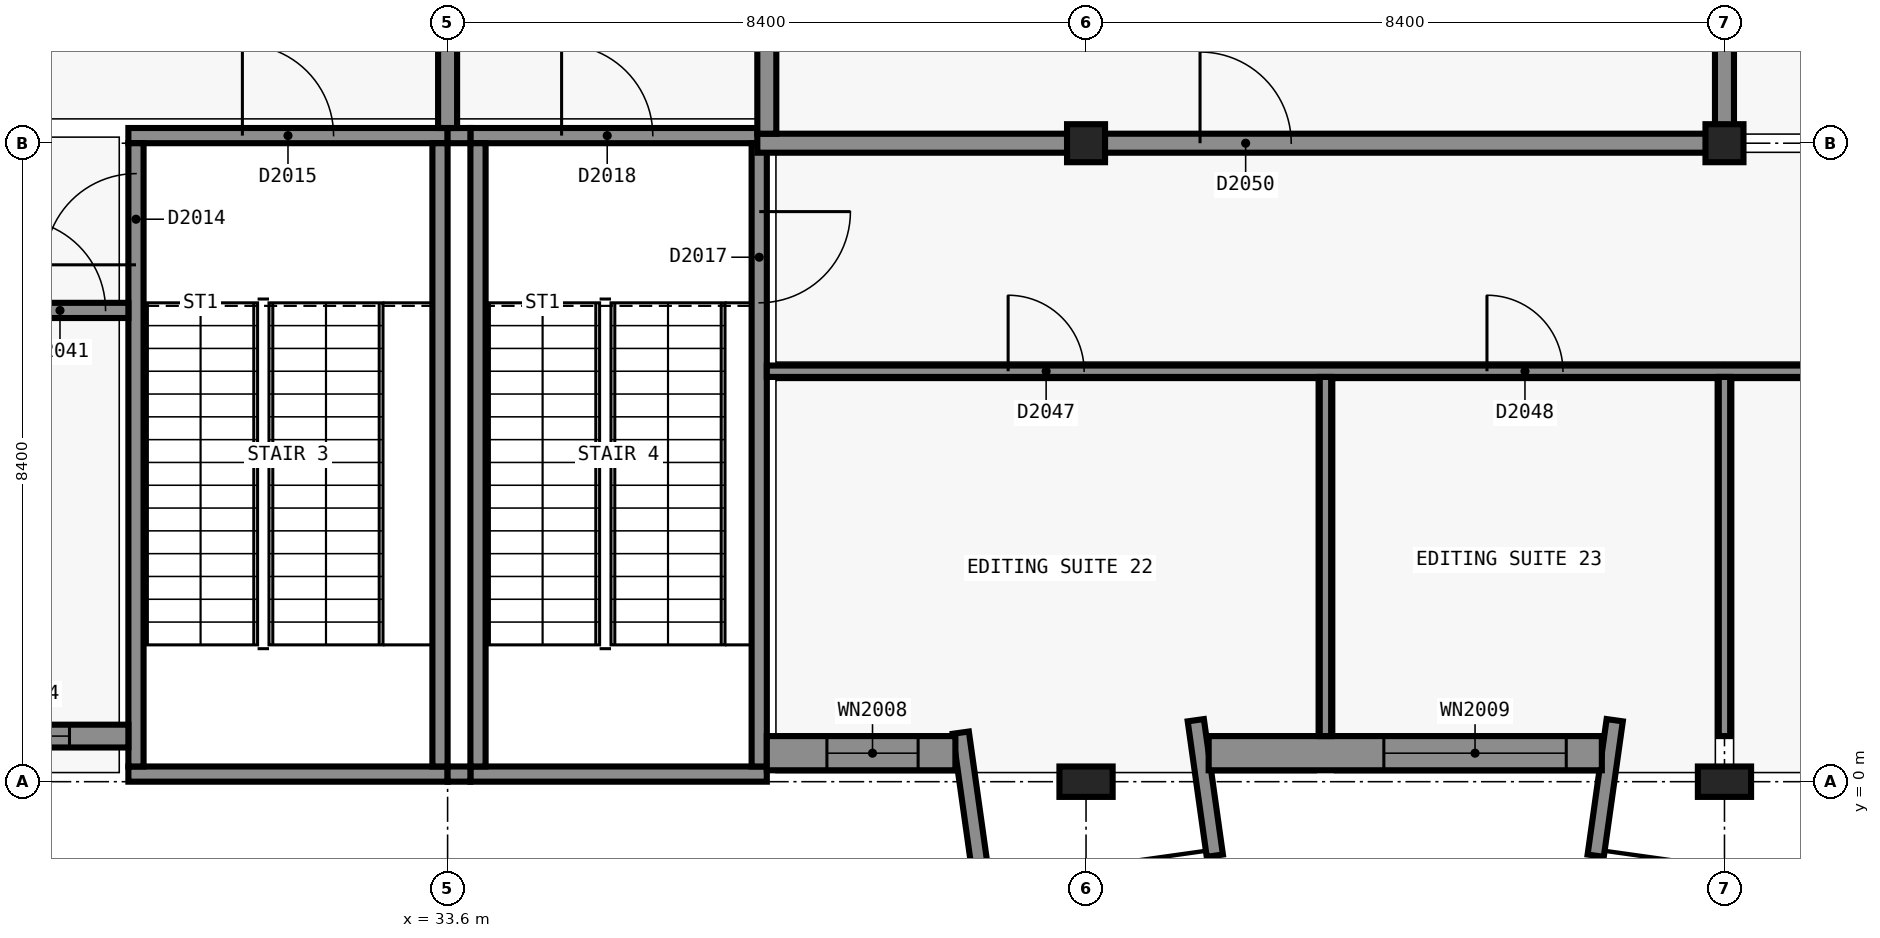
"""IFC4 building model, lengths in metres.
Left out: names, types, materials, properties, quantities, classifications, styles, units other than length and angle.
Written with IfcOpenShell. Run it as: python <this file> out.ifc"""

import sys

from ifc_helpers import new_model, si_unit, direction, frame, frame_2d, origin, origin_2d, place, context, subcontext, project, spatial, rectangle, extrude, element, fill, save


model = new_model("IFC4")
c1 = context("Model", 3, precision=1e-05, world=origin(), true_north=direction((0.0, 1.0)))
c2 = subcontext(c1, "Body", "Model", "MODEL_VIEW")
j1 = project(units=[si_unit("LENGTHUNIT", "METRE"), si_unit("PLANEANGLEUNIT", "RADIAN")], contexts=[c1])
p1 = place(None, origin())
s1 = spatial("IfcSite", under=j1, at=p1, CompositionType="ELEMENT")
p2 = place(p1, origin())
s2 = spatial("IfcBuilding", under=s1, at=p2, CompositionType="ELEMENT")
p3 = place(p2, frame((0.0, 0.0, 10.2)))
s3 = spatial("IfcBuildingStorey", under=s2, at=p3, CompositionType="ELEMENT", Elevation=10.2)
p4 = place(p3, frame((33.6, 0.1, 0.0), z_axis=(0.0, 0.0, 1.0), x_axis=(-1.0, 0.0, 0.0)))
e1 = element("IfcWall", 1, at=p4, inside=s3, PredefinedType="SHEAR", context=c2, shape_type="SweptSolid", body=[
    extrude(rectangle(XDim=4.2, YDim=0.2, at=frame_2d((2.1, 0.0))), origin(), (0.0, 0.0, 1.0), 4.8),
])
p5 = place(p3, frame((29.4, 8.5, 0.0), z_axis=(0.0, 0.0, 1.0), x_axis=(1.0, 0.0, 0.0)))
e2 = element("IfcWall", 2, at=p5, inside=s3, PredefinedType="SHEAR", context=c2, shape_type="SweptSolid", body=[
    extrude(rectangle(XDim=4.2, YDim=0.2, at=frame_2d((2.1, 0.0))), origin(), (0.0, 0.0, 1.0), 4.8),
])
p6 = place(p5, frame((1.5, 0.0, 0.0)))
e3 = element("IfcOpeningElement", 3, at=p6, cuts=e2, PredefinedType="OPENING", context=c2, shape_type="SweptSolid", body=[
    extrude(rectangle(XDim=1.2, YDim=2.1, at=frame_2d((0.6, 1.05))), frame((0.0, 0.11, 0.0), z_axis=(0.0, -1.0, 0.0), x_axis=(1.0, 0.0, 0.0)), (0.0, 0.0, 1.0), 0.22),
])
p7 = place(p3, frame((29.5, 0.2, 0.0), z_axis=(0.0, 0.0, 1.0), x_axis=(0.0, 1.0, 0.0)))
e4 = element("IfcWall", 4, at=p7, inside=s3, PredefinedType="SHEAR", context=c2, shape_type="SweptSolid", body=[
    extrude(rectangle(XDim=8.2, YDim=0.2, at=frame_2d((4.1, 0.0))), origin(), (0.0, 0.0, 1.0), 4.8),
])
p8 = place(p7, frame((6.6, 0.0, 0.0)))
e5 = element("IfcOpeningElement", 5, at=p8, cuts=e4, PredefinedType="OPENING", context=c2, shape_type="SweptSolid", body=[
    extrude(rectangle(XDim=1.2, YDim=2.1, at=frame_2d((0.6, 1.05))), frame((0.0, 0.11, 0.0), z_axis=(0.0, -1.0, 0.0), x_axis=(1.0, 0.0, 0.0)), (0.0, 0.0, 1.0), 0.22),
])
p9 = place(p3, frame((33.5, 8.4, 0.0), z_axis=(0.0, 0.0, 1.0), x_axis=(0.0, -1.0, 0.0)))
e6 = element("IfcWall", 6, at=p9, inside=s3, PredefinedType="SHEAR", context=c2, shape_type="SweptSolid", body=[
    extrude(rectangle(XDim=8.2, YDim=0.2, at=frame_2d((4.1, 0.0))), origin(), (0.0, 0.0, 1.0), 4.8),
])
p10 = place(p3, frame((37.8, 0.1, 0.0), z_axis=(0.0, 0.0, 1.0), x_axis=(-1.0, 0.0, 0.0)))
e7 = element("IfcWall", 7, at=p10, inside=s3, PredefinedType="SHEAR", context=c2, shape_type="SweptSolid", body=[
    extrude(rectangle(XDim=3.9, YDim=0.2, at=frame_2d((1.95, 0.0))), origin(), (0.0, 0.0, 1.0), 4.8),
])
p11 = place(p3, frame((33.9, 8.5, 0.0), z_axis=(0.0, 0.0, 1.0), x_axis=(1.0, 0.0, 0.0)))
e8 = element("IfcWall", 8, at=p11, inside=s3, PredefinedType="SHEAR", context=c2, shape_type="SweptSolid", body=[
    extrude(rectangle(XDim=3.9, YDim=0.2, at=frame_2d((1.95, 0.0))), origin(), (0.0, 0.0, 1.0), 4.8),
])
p12 = place(p11, frame((1.2, 0.0, 0.0)))
e9 = element("IfcOpeningElement", 9, at=p12, cuts=e8, PredefinedType="OPENING", context=c2, shape_type="SweptSolid", body=[
    extrude(rectangle(XDim=1.2, YDim=2.1, at=frame_2d((0.6, 1.05))), frame((0.0, 0.11, 0.0), z_axis=(0.0, -1.0, 0.0), x_axis=(1.0, 0.0, 0.0)), (0.0, 0.0, 1.0), 0.22),
])
p13 = place(p3, frame((34.0, 0.2, 0.0), z_axis=(0.0, 0.0, 1.0), x_axis=(0.0, 1.0, 0.0)))
e10 = element("IfcWall", 10, at=p13, inside=s3, PredefinedType="SHEAR", context=c2, shape_type="SweptSolid", body=[
    extrude(rectangle(XDim=8.2, YDim=0.2, at=frame_2d((4.1, 0.0))), origin(), (0.0, 0.0, 1.0), 4.8),
])
p14 = place(p3, frame((37.7, 8.4, 0.0), z_axis=(0.0, 0.0, 1.0), x_axis=(0.0, -1.0, 0.0)))
e11 = element("IfcWall", 11, at=p14, inside=s3, PredefinedType="SHEAR", context=c2, shape_type="SweptSolid", body=[
    extrude(rectangle(XDim=8.2, YDim=0.2, at=frame_2d((4.1, 0.0))), origin(), (0.0, 0.0, 1.0), 4.8),
])
p15 = place(p14, frame((0.9, 0.0, 0.0)))
e12 = element("IfcOpeningElement", 12, at=p15, cuts=e11, PredefinedType="OPENING", context=c2, shape_type="SweptSolid", body=[
    extrude(rectangle(XDim=1.2, YDim=2.1, at=frame_2d((0.6, 1.05))), frame((0.0, 0.11, 0.0), z_axis=(0.0, -1.0, 0.0), x_axis=(1.0, 0.0, 0.0)), (0.0, 0.0, 1.0), 0.22),
])
p16 = place(p3, frame((42.0, 0.0, 0.0), z_axis=(0.0, 0.0, 1.0), x_axis=(1.0, 0.0, 0.0)))
e13 = element("IfcColumn", 13, at=p16, inside=s3, PredefinedType="COLUMN", context=c2, shape_type="SweptSolid", body=[
    extrude(rectangle(XDim=0.7, YDim=0.4, at=origin_2d()), origin(), (0.0, 0.0, 1.0), 4.8),
])
p17 = place(p3, frame((42.0, 8.4, 0.0), z_axis=(0.0, 0.0, 1.0), x_axis=(1.0, 0.0, 0.0)))
e14 = element("IfcColumn", 14, at=p17, inside=s3, PredefinedType="COLUMN", context=c2, shape_type="SweptSolid", body=[
    extrude(rectangle(XDim=0.5, YDim=0.5, at=origin_2d()), origin(), (0.0, 0.0, 1.0), 4.8),
])
p18 = place(p3, frame((50.4, 0.0, 0.0), z_axis=(0.0, 0.0, 1.0), x_axis=(1.0, 0.0, 0.0)))
e15 = element("IfcColumn", 15, at=p18, inside=s3, PredefinedType="COLUMN", context=c2, shape_type="SweptSolid", body=[
    extrude(rectangle(XDim=0.7, YDim=0.4, at=origin_2d()), origin(), (0.0, 0.0, 1.0), 4.8),
])
p19 = place(p3, frame((50.4, 8.4, 0.0), z_axis=(0.0, 0.0, 1.0), x_axis=(1.0, 0.0, 0.0)))
e16 = element("IfcColumn", 16, at=p19, inside=s3, PredefinedType="COLUMN", context=c2, shape_type="SweptSolid", body=[
    extrude(rectangle(XDim=0.5, YDim=0.5, at=origin_2d()), origin(), (0.0, 0.0, 1.0), 4.8),
])
for number, where, z_axis, x_axis in (
    (17, (33.9, 0.1, 0.0), (0.0, 0.0, 1.0), (-1.0, 0.0, 0.0)),
    (18, (33.6, 8.5, 0.0), (0.0, 0.0, 1.0), (1.0, 0.0, 0.0)),
):
    element("IfcWall", number, at=place(p3, frame(where, z_axis=z_axis, x_axis=x_axis)), inside=s3, PredefinedType="SHEAR", context=c2, shape_type="SweptSolid", body=[
        extrude(rectangle(XDim=0.3, YDim=0.2, at=frame_2d((0.15, 0.0))), origin(), (0.0, 0.0, 1.0), 4.8),
    ])
p20 = place(p3, frame((29.4, 0.6, 0.0), z_axis=(0.0, 0.0, 1.0), x_axis=(-1.0, 0.0, 0.0)))
e19 = element("IfcWall", 19, at=p20, inside=s3, PredefinedType="SOLIDWALL", context=c2, shape_type="SweptSolid", body=[
    extrude(rectangle(XDim=2.449, YDim=0.3, at=frame_2d((1.225, 0.0))), origin(), (0.0, 0.0, 1.0), 4.5),
])
p21 = place(p20, frame((0.775, 0.0, 0.9)))
e20 = element("IfcOpeningElement", 20, at=p21, cuts=e19, PredefinedType="OPENING", context=c2, shape_type="SweptSolid", body=[
    extrude(rectangle(XDim=1.2, YDim=1.5, at=frame_2d((0.6, 0.75))), frame((0.0, 0.16, 0.0), z_axis=(0.0, -1.0, 0.0), x_axis=(1.0, 0.0, 0.0)), (0.0, 0.0, 1.0), 0.32),
])
p22 = place(p3, frame((40.352, 0.645, 0.0), z_axis=(0.0, 0.0, 1.0), x_axis=(0.139057680951, -0.990284283107, 0.0)))
e21 = element("IfcWall", 21, at=p22, inside=s3, PredefinedType="SOLIDWALL", context=c2, shape_type="SweptSolid", body=[
    extrude(rectangle(XDim=2.068, YDim=0.215, at=frame_2d((1.034, 0.0))), origin(), (0.0, 0.0, 1.0), 4.5),
])
for number, where, z_axis, x_axis in (
    (22, (43.444, 0.809, 0.0), (0.0, 0.0, 1.0), (0.139, -0.99, 0.0)),
    (23, (48.956, 0.809, 0.0), (0.0, 0.0, 1.0), (-0.139, -0.99, 0.0)),
):
    element("IfcWall", number, at=place(p3, frame(where, z_axis=z_axis, x_axis=x_axis)), inside=s3, PredefinedType="SOLIDWALL", context=c2, shape_type="SweptSolid", body=[
        extrude(rectangle(XDim=1.8, YDim=0.215, at=frame_2d((0.9, 0.0))), origin(), (0.0, 0.0, 1.0), 4.5),
    ])
p23 = place(p3, frame((40.281, 0.375, 0.0), z_axis=(0.0, 0.0, 1.0), x_axis=(-1.0, 0.0, 0.0)))
e24 = element("IfcWall", 24, at=p23, inside=s3, PredefinedType="SOLIDWALL", context=c2, shape_type="SweptSolid", body=[
    extrude(rectangle(XDim=2.481, YDim=0.45, at=frame_2d((1.24, 0.0))), origin(), (0.0, 0.0, 1.0), 4.5),
])
p24 = place(p23, frame((0.49, 0.0, 0.9)))
e25 = element("IfcOpeningElement", 25, at=p24, cuts=e24, PredefinedType="OPENING", context=c2, shape_type="SweptSolid", body=[
    extrude(rectangle(XDim=1.2, YDim=1.5, at=frame_2d((0.6, 0.75))), frame((0.0, 0.235, 0.0), z_axis=(0.0, -1.0, 0.0), x_axis=(1.0, 0.0, 0.0)), (0.0, 0.0, 1.0), 0.47),
])
p25 = place(p3, frame((48.787, 0.375, 0.0), z_axis=(0.0, 0.0, 1.0), x_axis=(-1.0, 0.0, 0.0)))
e26 = element("IfcWall", 26, at=p25, inside=s3, PredefinedType="SOLIDWALL", context=c2, shape_type="SweptSolid", body=[
    extrude(rectangle(XDim=5.173, YDim=0.45, at=frame_2d((2.586, 0.0))), origin(), (0.0, 0.0, 1.0), 4.5),
])
p26 = place(p25, frame((0.468, 0.0, 0.9)))
e27 = element("IfcOpeningElement", 27, at=p26, cuts=e26, PredefinedType="OPENING", context=c2, shape_type="SweptSolid", body=[
    extrude(rectangle(XDim=2.4, YDim=1.5, at=frame_2d((1.2, 0.75))), frame((0.0, 0.235, 0.0), z_axis=(0.0, -1.0, 0.0), x_axis=(1.0, 0.0, 0.0)), (0.0, 0.0, 1.0), 0.47),
])
p27 = place(p3, frame((37.675, 8.4, 0.0), z_axis=(0.0, 0.0, 1.0), x_axis=(1.0, 0.0, 0.0)))
e28 = element("IfcWall", 28, at=p27, inside=s3, PredefinedType="PARTITIONING", context=c2, shape_type="SweptSolid", body=[
    extrude(rectangle(XDim=12.85, YDim=0.25, at=frame_2d((6.425, 0.0))), origin(), (0.0, 0.0, 1.0), 3.8),
])
p28 = place(p27, frame((5.825, 0.0, 0.0)))
e29 = element("IfcOpeningElement", 29, at=p28, cuts=e28, PredefinedType="OPENING", context=c2, shape_type="SweptSolid", body=[
    extrude(rectangle(XDim=1.2, YDim=2.1, at=frame_2d((0.6, 1.05))), frame((0.0, 0.135, 0.0), z_axis=(0.0, -1.0, 0.0), x_axis=(1.0, 0.0, 0.0)), (0.0, 0.0, 1.0), 0.27),
])
p29 = place(p3, frame((33.6, 8.6, 0.0), z_axis=(0.0, 0.0, 1.0), x_axis=(0.0, 1.0, 0.0)))
e30 = element("IfcWall", 30, at=p29, inside=s3, PredefinedType="SOLIDWALL", context=c2, shape_type="SweptSolid", body=[
    extrude(rectangle(XDim=15.85, YDim=0.25, at=frame_2d((7.925, 0.0))), origin(), (0.0, 0.0, 1.0), 3.8),
])
p30 = place(p3, frame((37.8, 8.525, 0.0), z_axis=(0.0, 0.0, 1.0), x_axis=(0.0, 1.0, 0.0)))
e31 = element("IfcWall", 31, at=p30, inside=s3, PredefinedType="PARTITIONING", context=c2, shape_type="SweptSolid", body=[
    extrude(rectangle(XDim=16.675, YDim=0.25, at=frame_2d((8.337, 0.0))), origin(), (0.0, 0.0, 1.0), 3.8),
])
p31 = place(p3, frame((50.4, 8.525, 0.0), z_axis=(0.0, 0.0, 1.0), x_axis=(0.0, 1.0, 0.0)))
e32 = element("IfcWall", 32, at=p31, inside=s3, PredefinedType="PARTITIONING", context=c2, shape_type="SweptSolid", body=[
    extrude(rectangle(XDim=9.8, YDim=0.25, at=frame_2d((4.9, 0.0))), origin(), (0.0, 0.0, 1.0), 3.8),
])
p32 = place(p3, frame((27.5, 6.2, 0.0), z_axis=(0.0, 0.0, 1.0), x_axis=(1.0, 0.0, 0.0)))
e33 = element("IfcWall", 33, at=p32, inside=s3, PredefinedType="SOLIDWALL", context=c2, shape_type="SweptSolid", body=[
    extrude(rectangle(XDim=1.9, YDim=0.2, at=frame_2d((0.95, 0.0))), origin(), (0.0, 0.0, 1.0), 4.5),
])
p33 = place(p32, frame((0.4, 0.0, 0.0)))
e34 = element("IfcOpeningElement", 34, at=p33, cuts=e33, PredefinedType="OPENING", context=c2, shape_type="SweptSolid", body=[
    extrude(rectangle(XDim=1.2, YDim=2.1, at=frame_2d((0.6, 1.05))), frame((0.0, 0.11, 0.0), z_axis=(0.0, -1.0, 0.0), x_axis=(1.0, 0.0, 0.0)), (0.0, 0.0, 1.0), 0.22),
])
p34 = place(p3, frame((37.8, 5.4, 0.0), z_axis=(0.0, 0.0, 1.0), x_axis=(1.0, 0.0, 0.0)))
e35 = element("IfcWall", 35, at=p34, inside=s3, PredefinedType="PARTITIONING", context=c2, shape_type="SweptSolid", body=[
    extrude(rectangle(XDim=20.3, YDim=0.15, at=frame_2d((10.15, 0.0))), origin(), (0.0, 0.0, 1.0), 3.8),
])
p35 = place(p34, frame((3.175, 0.0, 0.0)))
e36 = element("IfcOpeningElement", 36, at=p35, cuts=e35, PredefinedType="OPENING", context=c2, shape_type="SweptSolid", body=[
    extrude(rectangle(XDim=1.0, YDim=2.1, at=frame_2d((0.5, 1.05))), frame((0.0, 0.085, 0.0), z_axis=(0.0, -1.0, 0.0), x_axis=(1.0, 0.0, 0.0)), (0.0, 0.0, 1.0), 0.17),
])
p36 = place(p34, frame((9.475, 0.0, 0.0)))
e37 = element("IfcOpeningElement", 37, at=p36, cuts=e35, PredefinedType="OPENING", context=c2, shape_type="SweptSolid", body=[
    extrude(rectangle(XDim=1.0, YDim=2.1, at=frame_2d((0.5, 1.05))), frame((0.0, 0.085, 0.0), z_axis=(0.0, -1.0, 0.0), x_axis=(1.0, 0.0, 0.0)), (0.0, 0.0, 1.0), 0.17),
])
p37 = place(p34, frame((16.2, 0.0, 0.0)))
e38 = element("IfcOpeningElement", 38, at=p37, cuts=e35, PredefinedType="OPENING", context=c2, shape_type="SweptSolid", body=[
    extrude(rectangle(XDim=1.0, YDim=2.1, at=frame_2d((0.5, 1.05))), frame((0.0, 0.085, 0.0), z_axis=(0.0, -1.0, 0.0), x_axis=(1.0, 0.0, 0.0)), (0.0, 0.0, 1.0), 0.17),
])
p38 = place(p3, frame((45.15, 0.6, 0.0), z_axis=(0.0, 0.0, 1.0), x_axis=(0.0, 1.0, 0.0)))
e39 = element("IfcWall", 39, at=p38, inside=s3, PredefinedType="PARTITIONING", context=c2, shape_type="SweptSolid", body=[
    extrude(rectangle(XDim=4.725, YDim=0.15, at=frame_2d((2.362, 0.0))), origin(), (0.0, 0.0, 1.0), 4.5),
])
p39 = place(p3, frame((50.4, 0.6, 0.0), z_axis=(0.0, 0.0, 1.0), x_axis=(0.0, 1.0, 0.0)))
e40 = element("IfcWall", 40, at=p39, inside=s3, PredefinedType="PARTITIONING", context=c2, shape_type="SweptSolid", body=[
    extrude(rectangle(XDim=4.725, YDim=0.15, at=frame_2d((2.362, 0.0))), origin(), (0.0, 0.0, 1.0), 3.8),
])
p40 = place(p21, origin())
e41 = element("IfcWindow", 41, at=p40, inside=s3, PartitioningType="SINGLE_PANEL", PredefinedType="WINDOW", context=c2, shape_type="SweptSolid", body=[
    extrude(rectangle(XDim=1.2, YDim=1.5, at=frame_2d((0.6, 0.75))), frame((0.0, 0.03, 0.0), z_axis=(0.0, -1.0, 0.0), x_axis=(1.0, 0.0, 0.0)), (0.0, 0.0, 1.0), 0.06),
])
fill(e20, e41)
p41 = place(p24, origin())
e42 = element("IfcWindow", 42, at=p41, inside=s3, PartitioningType="SINGLE_PANEL", PredefinedType="WINDOW", context=c2, shape_type="SweptSolid", body=[
    extrude(rectangle(XDim=1.2, YDim=1.5, at=frame_2d((0.6, 0.75))), frame((0.0, 0.03, 0.0), z_axis=(0.0, -1.0, 0.0), x_axis=(1.0, 0.0, 0.0)), (0.0, 0.0, 1.0), 0.06),
])
fill(e25, e42)
p42 = place(p26, origin())
e43 = element("IfcWindow", 43, at=p42, inside=s3, PartitioningType="SINGLE_PANEL", PredefinedType="WINDOW", context=c2, shape_type="SweptSolid", body=[
    extrude(rectangle(XDim=2.4, YDim=1.5, at=frame_2d((1.2, 0.75))), frame((0.0, 0.03, 0.0), z_axis=(0.0, -1.0, 0.0), x_axis=(1.0, 0.0, 0.0)), (0.0, 0.0, 1.0), 0.06),
])
fill(e27, e43)
p43 = place(p8, origin())
e44 = element("IfcDoor", 44, at=p43, inside=s3, OperationType="SINGLE_SWING_RIGHT", PredefinedType="DOOR", context=c2, shape_type="SweptSolid", body=[
    extrude(rectangle(XDim=1.2, YDim=2.1, at=frame_2d((0.6, 1.05))), frame((0.0, 0.025, 0.0), z_axis=(0.0, -1.0, 0.0), x_axis=(1.0, 0.0, 0.0)), (0.0, 0.0, 1.0), 0.05),
])
fill(e5, e44)
p44 = place(p6, origin())
e45 = element("IfcDoor", 45, at=p44, inside=s3, OperationType="SINGLE_SWING_RIGHT", PredefinedType="DOOR", context=c2, shape_type="SweptSolid", body=[
    extrude(rectangle(XDim=1.2, YDim=2.1, at=frame_2d((0.6, 1.05))), frame((0.0, 0.025, 0.0), z_axis=(0.0, -1.0, 0.0), x_axis=(1.0, 0.0, 0.0)), (0.0, 0.0, 1.0), 0.05),
])
fill(e3, e45)
p45 = place(p15, origin())
e46 = element("IfcDoor", 46, at=p45, inside=s3, OperationType="SINGLE_SWING_RIGHT", PredefinedType="DOOR", context=c2, shape_type="SweptSolid", body=[
    extrude(rectangle(XDim=1.2, YDim=2.1, at=frame_2d((0.6, 1.05))), frame((0.0, 0.025, 0.0), z_axis=(0.0, -1.0, 0.0), x_axis=(1.0, 0.0, 0.0)), (0.0, 0.0, 1.0), 0.05),
])
fill(e12, e46)
p46 = place(p12, origin())
e47 = element("IfcDoor", 47, at=p46, inside=s3, OperationType="SINGLE_SWING_RIGHT", PredefinedType="DOOR", context=c2, shape_type="SweptSolid", body=[
    extrude(rectangle(XDim=1.2, YDim=2.1, at=frame_2d((0.6, 1.05))), frame((0.0, 0.025, 0.0), z_axis=(0.0, -1.0, 0.0), x_axis=(1.0, 0.0, 0.0)), (0.0, 0.0, 1.0), 0.05),
])
fill(e9, e47)
p47 = place(p33, origin())
e48 = element("IfcDoor", 48, at=p47, inside=s3, OperationType="SINGLE_SWING_RIGHT", PredefinedType="DOOR", context=c2, shape_type="SweptSolid", body=[
    extrude(rectangle(XDim=1.2, YDim=2.1, at=frame_2d((0.6, 1.05))), frame((0.0, 0.025, 0.0), z_axis=(0.0, -1.0, 0.0), x_axis=(1.0, 0.0, 0.0)), (0.0, 0.0, 1.0), 0.05),
])
fill(e34, e48)
p48 = place(p35, origin())
e49 = element("IfcDoor", 49, at=p48, inside=s3, OperationType="SINGLE_SWING_LEFT", PredefinedType="DOOR", context=c2, shape_type="SweptSolid", body=[
    extrude(rectangle(XDim=1.0, YDim=2.1, at=frame_2d((0.5, 1.05))), frame((0.0, 0.025, 0.0), z_axis=(0.0, -1.0, 0.0), x_axis=(1.0, 0.0, 0.0)), (0.0, 0.0, 1.0), 0.05),
])
fill(e36, e49)
p49 = place(p36, origin())
e50 = element("IfcDoor", 50, at=p49, inside=s3, OperationType="SINGLE_SWING_RIGHT", PredefinedType="DOOR", context=c2, shape_type="SweptSolid", body=[
    extrude(rectangle(XDim=1.0, YDim=2.1, at=frame_2d((0.5, 1.05))), frame((0.0, 0.025, 0.0), z_axis=(0.0, -1.0, 0.0), x_axis=(1.0, 0.0, 0.0)), (0.0, 0.0, 1.0), 0.05),
])
fill(e37, e50)
p50 = place(p28, origin())
e51 = element("IfcDoor", 51, at=p50, inside=s3, OperationType="SINGLE_SWING_LEFT", PredefinedType="DOOR", context=c2, shape_type="SweptSolid", body=[
    extrude(rectangle(XDim=1.2, YDim=2.1, at=frame_2d((0.6, 1.05))), frame((0.0, 0.025, 0.0), z_axis=(0.0, -1.0, 0.0), x_axis=(1.0, 0.0, 0.0)), (0.0, 0.0, 1.0), 0.05),
])
fill(e29, e51)
save(model, sys.argv[1])
